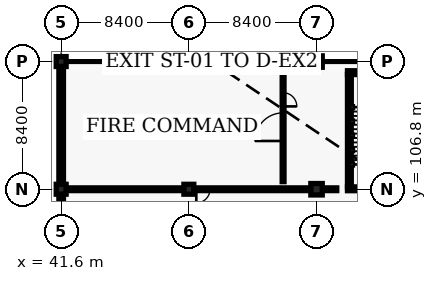
"""IFC4 building model, lengths in metres.
Left out: names, types, materials, properties, quantities, classifications, styles, units other than length and angle.
Written with IfcOpenShell. Run it as: python <this file> out.ifc"""

import sys

from ifc_helpers import new_model, si_unit, direction, frame, frame_2d, origin, origin_2d, place, context, subcontext, project, spatial, rectangle, extrude, element, fill, save


model = new_model("IFC4")
c1 = context("Model", 3, precision=1e-05, world=origin(), true_north=direction((0.0, 1.0)))
c2 = subcontext(c1, "Body", "Model", "MODEL_VIEW")
j1 = project(units=[si_unit("LENGTHUNIT", "METRE"), si_unit("PLANEANGLEUNIT", "RADIAN")], contexts=[c1])
p1 = place(None, origin())
s1 = spatial("IfcSite", under=j1, at=p1, CompositionType="ELEMENT")
p2 = place(p1, origin())
s2 = spatial("IfcBuilding", under=s1, at=p2, CompositionType="ELEMENT")
p3 = place(p2, origin())
s3 = spatial("IfcBuildingStorey", under=s2, at=p3, CompositionType="ELEMENT", Elevation=0.0)
for number, where, z_axis, x_axis in (
    (1, (41.6, 106.8, 0.0), (0.0, 0.0, 1.0), (1.0, 0.0, 0.0)),
    (2, (41.6, 115.2, 0.0), (0.0, 0.0, 1.0), (1.0, 0.0, 0.0)),
    (3, (50.0, 106.8, 0.0), (0.0, 0.0, 1.0), (1.0, 0.0, 0.0)),
    (4, (50.0, 115.2, 0.0), (0.0, 0.0, 1.0), (1.0, 0.0, 0.0)),
):
    element("IfcColumn", number, at=place(p3, frame(where, z_axis=z_axis, x_axis=x_axis)), inside=s3, PredefinedType="COLUMN", context=c2, shape_type="SweptSolid", body=[
        extrude(rectangle(XDim=0.65, YDim=0.65, at=origin_2d()), origin(), (0.0, 0.0, 1.0), 4.8),
    ])
for number, where, z_axis, x_axis in (
    (5, (58.4, 106.8, 0.0), (0.0, 0.0, 1.0), (1.0, 0.0, 0.0)),
    (6, (58.4, 115.2, 0.0), (0.0, 0.0, 1.0), (1.0, 0.0, 0.0)),
):
    element("IfcColumn", number, at=place(p3, frame(where, z_axis=z_axis, x_axis=x_axis)), inside=s3, PredefinedType="COLUMN", context=c2, shape_type="SweptSolid", body=[
        extrude(rectangle(XDim=0.75, YDim=0.75, at=origin_2d()), origin(), (0.0, 0.0, 1.0), 4.8),
    ])
p4 = place(p3, frame((50.1, 115.2, 0.0), z_axis=(0.0, 0.0, 1.0), x_axis=(1.0, 0.0, 0.0)))
e7 = element("IfcWall", 7, at=p4, inside=s3, PredefinedType="SOLIDWALL", context=c2, shape_type="SweptSolid", body=[
    extrude(rectangle(XDim=8.2, YDim=0.34, at=frame_2d((4.1, 0.0))), origin(), (0.0, 0.0, 1.0), 3.675),
])
p5 = place(p4, frame((3.05, 0.0, 0.95)))
e8 = element("IfcOpeningElement", 8, at=p5, cuts=e7, PredefinedType="OPENING", context=c2, shape_type="SweptSolid", body=[
    extrude(rectangle(XDim=2.1, YDim=1.8, at=frame_2d((1.05, 0.9))), frame((0.0, 0.18, 0.0), z_axis=(0.0, -1.0, 0.0), x_axis=(1.0, 0.0, 0.0)), (0.0, 0.0, 1.0), 0.36),
])
p6 = place(p4, frame((0.35, 0.0, 0.0)))
e9 = element("IfcOpeningElement", 9, at=p6, cuts=e7, PredefinedType="OPENING", context=c2, shape_type="SweptSolid", body=[
    extrude(rectangle(XDim=2.1, YDim=2.35, at=frame_2d((1.05, 1.175))), frame((0.0, 0.18, 0.0), z_axis=(0.0, -1.0, 0.0), x_axis=(1.0, 0.0, 0.0)), (0.0, 0.0, 1.0), 0.36),
])
p7 = place(p3, frame((41.6, 98.5, 0.0), z_axis=(0.0, 0.0, 1.0), x_axis=(0.0, 1.0, 0.0)))
e10 = element("IfcWall", 10, at=p7, inside=s3, PredefinedType="SOLIDWALL", context=c2, shape_type="SweptSolid", body=[
    extrude(rectangle(XDim=8.2, YDim=0.3, at=frame_2d((4.1, 0.0))), origin(), (0.0, 0.0, 1.0), 4.075),
])
p8 = place(p7, frame((2.15, 0.0, 0.0)))
e11 = element("IfcOpeningElement", 11, at=p8, cuts=e10, PredefinedType="OPENING", context=c2, shape_type="SweptSolid", body=[
    extrude(rectangle(XDim=2.1, YDim=2.35, at=frame_2d((1.05, 1.175))), frame((0.0, 0.16, 0.0), z_axis=(0.0, -1.0, 0.0), x_axis=(1.0, 0.0, 0.0)), (0.0, 0.0, 1.0), 0.32),
])
p9 = place(p3, frame((41.6, 106.9, 0.0), z_axis=(0.0, 0.0, 1.0), x_axis=(0.0, 1.0, 0.0)))
e12 = element("IfcWall", 12, at=p9, inside=s3, PredefinedType="SOLIDWALL", context=c2, shape_type="SweptSolid", body=[
    extrude(rectangle(XDim=8.2, YDim=0.3, at=frame_2d((4.1, 0.0))), origin(), (0.0, 0.0, 1.0), 4.075),
])
p10 = place(p3, frame((64.045, 106.83, 0.0), z_axis=(0.0, 0.0, 1.0), x_axis=(-1.0, 0.0, 0.0)))
e13 = element("IfcWall", 13, at=p10, inside=s3, PredefinedType="SHEAR", context=c2, shape_type="SweptSolid", body=[
    extrude(rectangle(XDim=3.61, YDim=0.25, at=frame_2d((1.805, 0.0))), origin(), (0.0, 0.0, 1.0), 4.56),
])
p11 = place(p10, frame((1.205, 0.0, 0.0)))
e14 = element("IfcOpeningElement", 14, at=p11, cuts=e13, PredefinedType="OPENING", context=c2, shape_type="SweptSolid", body=[
    extrude(rectangle(XDim=1.2, YDim=2.15, at=frame_2d((0.6, 1.075))), frame((0.0, 0.135, 0.0), z_axis=(0.0, -1.0, 0.0), x_axis=(1.0, 0.0, 0.0)), (0.0, 0.0, 1.0), 0.27),
])
p12 = place(p3, frame((60.435, 114.47, 0.0), z_axis=(0.0, 0.0, 1.0), x_axis=(1.0, 0.0, 0.0)))
e15 = element("IfcWall", 15, at=p12, inside=s3, PredefinedType="SHEAR", context=c2, shape_type="SweptSolid", body=[
    extrude(rectangle(XDim=3.61, YDim=0.25, at=frame_2d((1.805, 0.0))), origin(), (0.0, 0.0, 1.0), 4.56),
])
p13 = place(p3, frame((60.56, 106.955, 0.0), z_axis=(0.0, 0.0, 1.0), x_axis=(0.0, 1.0, 0.0)))
e16 = element("IfcWall", 16, at=p13, inside=s3, PredefinedType="SHEAR", context=c2, shape_type="SweptSolid", body=[
    extrude(rectangle(XDim=7.39, YDim=0.25, at=frame_2d((3.695, 0.0))), origin(), (0.0, 0.0, 1.0), 4.56),
])
p14 = place(p3, frame((42.15, 106.8, 0.0), z_axis=(0.0, 0.0, 1.0), x_axis=(1.0, 0.0, 0.0)))
e17 = element("IfcWall", 17, at=p14, inside=s3, PredefinedType="PARTITIONING", context=c2, shape_type="SweptSolid", body=[
    extrude(rectangle(XDim=17.58, YDim=0.18, at=frame_2d((8.79, 0.0))), origin(), (0.0, 0.0, 1.0), 3.675),
])
p15 = place(p14, frame((8.34, 0.0, 0.0)))
e18 = element("IfcOpeningElement", 18, at=p15, cuts=e17, PredefinedType="OPENING", context=c2, shape_type="SweptSolid", body=[
    extrude(rectangle(XDim=0.9, YDim=2.06, at=frame_2d((0.45, 1.03))), frame((0.0, 0.1, 0.0), z_axis=(0.0, -1.0, 0.0), x_axis=(1.0, 0.0, 0.0)), (0.0, 0.0, 1.0), 0.2),
])
p16 = place(p3, frame((56.2, 107.3, 0.0), z_axis=(0.0, 0.0, 1.0), x_axis=(0.0, 1.0, 0.0)))
e19 = element("IfcWall", 19, at=p16, inside=s3, PredefinedType="PARTITIONING", context=c2, shape_type="SweptSolid", body=[
    extrude(rectangle(XDim=7.2, YDim=0.12, at=frame_2d((3.6, 0.0))), origin(), (0.0, 0.0, 1.0), 4.545),
])
p17 = place(p16, frame((2.675, 0.0, 0.0)))
e20 = element("IfcOpeningElement", 20, at=p17, cuts=e19, PredefinedType="OPENING", context=c2, shape_type="SweptSolid", body=[
    extrude(rectangle(XDim=1.85, YDim=2.22, at=frame_2d((0.925, 1.11))), frame((0.0, 0.07, 0.0), z_axis=(0.0, -1.0, 0.0), x_axis=(1.0, 0.0, 0.0)), (0.0, 0.0, 1.0), 0.14),
])
p18 = place(p16, frame((4.95, 0.0, 0.0)))
e21 = element("IfcOpeningElement", 21, at=p18, cuts=e19, PredefinedType="OPENING", context=c2, shape_type="SweptSolid", body=[
    extrude(rectangle(XDim=0.9, YDim=2.06, at=frame_2d((0.45, 1.03))), frame((0.0, 0.07, 0.0), z_axis=(0.0, -1.0, 0.0), x_axis=(1.0, 0.0, 0.0)), (0.0, 0.0, 1.0), 0.14),
])
p19 = place(p5, origin())
e22 = element("IfcWindow", 22, at=p19, inside=s3, PartitioningType="SINGLE_PANEL", PredefinedType="WINDOW", context=c2, shape_type="SweptSolid", body=[
    extrude(rectangle(XDim=2.1, YDim=1.8, at=frame_2d((1.05, 0.9))), frame((0.0, 0.03, 0.0), z_axis=(0.0, -1.0, 0.0), x_axis=(1.0, 0.0, 0.0)), (0.0, 0.0, 1.0), 0.06),
])
fill(e8, e22)
p20 = place(p6, origin())
e23 = element("IfcDoor", 23, at=p20, inside=s3, OperationType="DOUBLE_DOOR_SINGLE_SWING", PredefinedType="DOOR", context=c2, shape_type="SweptSolid", body=[
    extrude(rectangle(XDim=2.1, YDim=2.35, at=frame_2d((1.05, 1.175))), frame((0.0, 0.025, 0.0), z_axis=(0.0, -1.0, 0.0), x_axis=(1.0, 0.0, 0.0)), (0.0, 0.0, 1.0), 0.05),
])
fill(e9, e23)
p21 = place(p15, origin())
e24 = element("IfcDoor", 24, at=p21, inside=s3, OperationType="SINGLE_SWING_RIGHT", PredefinedType="DOOR", context=c2, shape_type="SweptSolid", body=[
    extrude(rectangle(XDim=0.9, YDim=2.06, at=frame_2d((0.45, 1.03))), frame((0.0, 0.025, 0.0), z_axis=(0.0, -1.0, 0.0), x_axis=(1.0, 0.0, 0.0)), (0.0, 0.0, 1.0), 0.05),
])
fill(e18, e24)
p22 = place(p17, origin())
e25 = element("IfcDoor", 25, at=p22, inside=s3, OperationType="DOUBLE_DOOR_SINGLE_SWING", PredefinedType="DOOR", context=c2, shape_type="SweptSolid", body=[
    extrude(rectangle(XDim=1.85, YDim=2.22, at=frame_2d((0.925, 1.11))), frame((0.0, 0.025, 0.0), z_axis=(0.0, -1.0, 0.0), x_axis=(1.0, 0.0, 0.0)), (0.0, 0.0, 1.0), 0.05),
])
fill(e20, e25)
p23 = place(p18, origin())
e26 = element("IfcDoor", 26, at=p23, inside=s3, OperationType="SINGLE_SWING_RIGHT", PredefinedType="DOOR", context=c2, shape_type="SweptSolid", body=[
    extrude(rectangle(XDim=0.9, YDim=2.06, at=frame_2d((0.45, 1.03))), frame((0.0, 0.025, 0.0), z_axis=(0.0, -1.0, 0.0), x_axis=(1.0, 0.0, 0.0)), (0.0, 0.0, 1.0), 0.05),
])
fill(e21, e26)
save(model, sys.argv[1])
